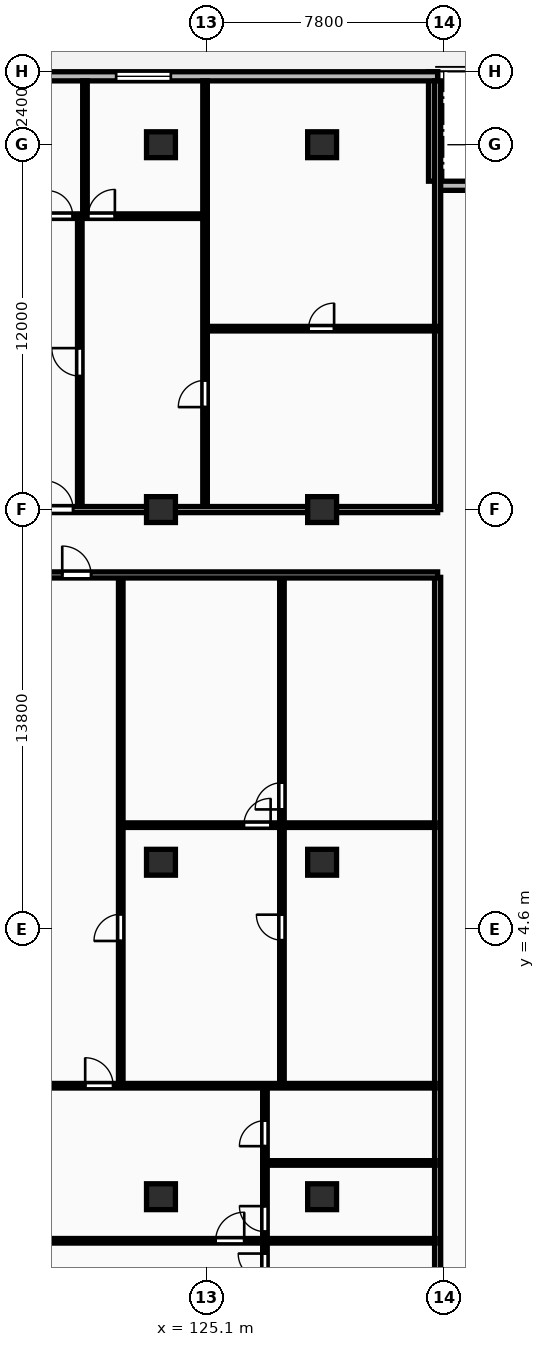
"""IFC4 building model, lengths in metres.
Left out: names, types, materials, properties, quantities, classifications, styles, units other than length and angle.
Written with IfcOpenShell. Run it as: python <this file> out.ifc"""

import sys

from ifc_helpers import new_model, si_unit, direction, frame, frame_2d, origin, origin_2d, place, context, subcontext, project, spatial, rectangle, extrude, element, fill, save


model = new_model("IFC4")
c1 = context("Model", 3, precision=1e-05, world=origin(), true_north=direction((0.0, 1.0)))
c2 = subcontext(c1, "Body", "Model", "MODEL_VIEW")
j1 = project(units=[si_unit("LENGTHUNIT", "METRE"), si_unit("PLANEANGLEUNIT", "RADIAN")], contexts=[c1])
p1 = place(None, origin())
s1 = spatial("IfcSite", under=j1, at=p1, CompositionType="ELEMENT")
p2 = place(p1, origin())
s2 = spatial("IfcBuilding", under=s1, at=p2, CompositionType="ELEMENT")
p3 = place(p2, frame((0.0, 0.0, 24.0)))
s3 = spatial("IfcBuildingStorey", under=s2, at=p3, CompositionType="ELEMENT", Elevation=24.0)
for number, where, z_axis, x_axis in (
    (1, (123.6, -4.2, 0.0), (0.0, 0.0, 1.0), (1.0, 0.0, 0.0)),
    (2, (123.6, 6.8, 0.0), (0.0, 0.0, 1.0), (1.0, 0.0, 0.0)),
    (3, (123.6, 18.4, 0.0), (0.0, 0.0, 1.0), (1.0, 0.0, 0.0)),
    (4, (123.6, 30.4, 0.0), (0.0, 0.0, 1.0), (1.0, 0.0, 0.0)),
    (5, (128.9, -4.2, 0.0), (0.0, 0.0, 1.0), (1.0, 0.0, 0.0)),
    (6, (128.9, 6.8, 0.0), (0.0, 0.0, 1.0), (1.0, 0.0, 0.0)),
    (7, (128.9, 18.4, 0.0), (0.0, 0.0, 1.0), (1.0, 0.0, 0.0)),
    (8, (128.9, 30.4, 0.0), (0.0, 0.0, 1.0), (1.0, 0.0, 0.0)),
):
    element("IfcColumn", number, at=place(p3, frame(where, z_axis=z_axis, x_axis=x_axis)), inside=s3, PredefinedType="COLUMN", context=c2, shape_type="SweptSolid", body=[
        extrude(rectangle(XDim=0.95, YDim=0.85, at=origin_2d()), origin(), (0.0, 0.0, 1.0), 3.25),
    ])
for number, where, z_axis, x_axis in (
    (9, (136.3, 29.05, 0.0), (0.0, 0.0, 1.0), (-1.0, 0.0, 0.0)),
    (10, (132.55, 29.2, 0.0), (0.0, 0.0, 1.0), (0.0, 1.0, 0.0)),
):
    element("IfcWall", number, at=place(p3, frame(where, z_axis=z_axis, x_axis=x_axis)), inside=s3, PredefinedType="STANDARD", context=c2, shape_type="SweptSolid", body=[
        extrude(rectangle(XDim=3.6, YDim=0.3, at=frame_2d((1.8, 0.0))), origin(), (0.0, 0.0, 1.0), 2.97),
    ])
p4 = place(p3, frame((132.7, 32.65, 0.0), z_axis=(0.0, 0.0, 1.0), x_axis=(-1.0, 0.0, 0.0)))
e11 = element("IfcWall", 11, at=p4, inside=s3, PredefinedType="STANDARD", context=c2, shape_type="SweptSolid", body=[
    extrude(rectangle(XDim=62.0, YDim=0.3, at=frame_2d((31.0, 0.0))), origin(), (0.0, 0.0, 1.0), 2.97),
])
p5 = place(p4, frame((52.125, 0.0, 0.85)))
e12 = element("IfcOpeningElement", 12, at=p5, cuts=e11, PredefinedType="OPENING", context=c2, shape_type="SweptSolid", body=[
    extrude(rectangle(XDim=1.8, YDim=1.8, at=frame_2d((0.9, 0.9))), frame((0.0, 0.16, 0.0), z_axis=(0.0, -1.0, 0.0), x_axis=(1.0, 0.0, 0.0)), (0.0, 0.0, 1.0), 0.32),
])
p6 = place(p4, frame((8.775, 0.0, 0.85)))
e13 = element("IfcOpeningElement", 13, at=p6, cuts=e11, PredefinedType="OPENING", context=c2, shape_type="SweptSolid", body=[
    extrude(rectangle(XDim=1.8, YDim=1.8, at=frame_2d((0.9, 0.9))), frame((0.0, 0.16, 0.0), z_axis=(0.0, -1.0, 0.0), x_axis=(1.0, 0.0, 0.0)), (0.0, 0.0, 1.0), 0.32),
])
p7 = place(p3, frame((132.7, 18.4, 0.0), z_axis=(0.0, 0.0, 1.0), x_axis=(0.0, 1.0, 0.0)))
e14 = element("IfcWall", 14, at=p7, inside=s3, PredefinedType="PARTITIONING", context=c2, shape_type="SweptSolid", body=[
    extrude(rectangle(XDim=14.1, YDim=0.2, at=frame_2d((7.05, 0.0))), origin(), (0.0, 0.0, 1.0), 2.97),
])
p8 = place(p3, frame((125.05, 24.35, 0.0), z_axis=(0.0, 0.0, 1.0), x_axis=(1.0, 0.0, 0.0)))
e15 = element("IfcWall", 15, at=p8, inside=s3, PredefinedType="PARTITIONING", context=c2, shape_type="SweptSolid", body=[
    extrude(rectangle(XDim=7.65, YDim=0.15, at=frame_2d((3.825, 0.0))), origin(), (0.0, 0.0, 1.0), 2.97),
])
p9 = place(p8, frame((3.405, 0.0, 0.0)))
e16 = element("IfcOpeningElement", 16, at=p9, cuts=e15, PredefinedType="OPENING", context=c2, shape_type="SweptSolid", body=[
    extrude(rectangle(XDim=0.84, YDim=2.04, at=frame_2d((0.42, 1.02))), frame((0.0, 0.085, 0.0), z_axis=(0.0, -1.0, 0.0), x_axis=(1.0, 0.0, 0.0)), (0.0, 0.0, 1.0), 0.17),
])
p10 = place(p3, frame((125.05, 18.45, 0.0), z_axis=(0.0, 0.0, 1.0), x_axis=(0.0, 1.0, 0.0)))
e17 = element("IfcWall", 17, at=p10, inside=s3, PredefinedType="PARTITIONING", context=c2, shape_type="SweptSolid", body=[
    extrude(rectangle(XDim=14.05, YDim=0.15, at=frame_2d((7.025, 0.0))), origin(), (0.0, 0.0, 1.0), 2.97),
])
p11 = place(p10, frame((3.32, 0.0, 0.0)))
e18 = element("IfcOpeningElement", 18, at=p11, cuts=e17, PredefinedType="OPENING", context=c2, shape_type="SweptSolid", body=[
    extrude(rectangle(XDim=0.88, YDim=2.06, at=frame_2d((0.44, 1.03))), frame((0.0, 0.085, 0.0), z_axis=(0.0, -1.0, 0.0), x_axis=(1.0, 0.0, 0.0)), (0.0, 0.0, 1.0), 0.17),
])
p12 = place(p3, frame((120.93, 18.45, 0.0), z_axis=(0.0, 0.0, 1.0), x_axis=(0.0, 1.0, 0.0)))
e19 = element("IfcWall", 19, at=p12, inside=s3, PredefinedType="PARTITIONING", context=c2, shape_type="SweptSolid", body=[
    extrude(rectangle(XDim=9.6, YDim=0.15, at=frame_2d((4.8, 0.0))), origin(), (0.0, 0.0, 1.0), 2.97),
])
p13 = place(p12, frame((4.34, 0.0, 0.0)))
e20 = element("IfcOpeningElement", 20, at=p13, cuts=e19, PredefinedType="OPENING", context=c2, shape_type="SweptSolid", body=[
    extrude(rectangle(XDim=0.92, YDim=2.08, at=frame_2d((0.46, 1.04))), frame((0.0, 0.085, 0.0), z_axis=(0.0, -1.0, 0.0), x_axis=(1.0, 0.0, 0.0)), (0.0, 0.0, 1.0), 0.17),
])
p14 = place(p3, frame((121.1, 28.05, 0.0), z_axis=(0.0, 0.0, 1.0), x_axis=(0.0, 1.0, 0.0)))
e21 = element("IfcWall", 21, at=p14, inside=s3, PredefinedType="PARTITIONING", context=c2, shape_type="SweptSolid", body=[
    extrude(rectangle(XDim=4.45, YDim=0.15, at=frame_2d((2.225, 0.0))), origin(), (0.0, 0.0, 1.0), 2.97),
])
p15 = place(p3, frame((118.27, 28.05, 0.0), z_axis=(0.0, 0.0, 1.0), x_axis=(1.0, 0.0, 0.0)))
e22 = element("IfcWall", 22, at=p15, inside=s3, PredefinedType="PARTITIONING", context=c2, shape_type="SweptSolid", body=[
    extrude(rectangle(XDim=6.76, YDim=0.15, at=frame_2d((3.38, 0.0))), origin(), (0.0, 0.0, 1.0), 2.97),
])
p16 = place(p15, frame((1.587, 0.0, 0.0)))
e23 = element("IfcOpeningElement", 23, at=p16, cuts=e22, PredefinedType="OPENING", context=c2, shape_type="SweptSolid", body=[
    extrude(rectangle(XDim=0.84, YDim=2.04, at=frame_2d((0.42, 1.02))), frame((0.0, 0.085, 0.0), z_axis=(0.0, -1.0, 0.0), x_axis=(1.0, 0.0, 0.0)), (0.0, 0.0, 1.0), 0.17),
])
p17 = place(p15, frame((2.934, 0.0, 0.0)))
e24 = element("IfcOpeningElement", 24, at=p17, cuts=e22, PredefinedType="OPENING", context=c2, shape_type="SweptSolid", body=[
    extrude(rectangle(XDim=0.88, YDim=2.06, at=frame_2d((0.44, 1.03))), frame((0.0, 0.085, 0.0), z_axis=(0.0, -1.0, 0.0), x_axis=(1.0, 0.0, 0.0)), (0.0, 0.0, 1.0), 0.17),
])
p18 = place(p3, frame((118.25, 18.4, 0.0), z_axis=(0.0, 0.0, 1.0), x_axis=(1.0, 0.0, 0.0)))
e25 = element("IfcWall", 25, at=p18, inside=s3, PredefinedType="PARTITIONING", context=c2, shape_type="SweptSolid", body=[
    extrude(rectangle(XDim=14.45, YDim=0.2, at=frame_2d((7.225, 0.0))), origin(), (0.0, 0.0, 1.0), 2.37),
])
p19 = place(p18, frame((1.51, 0.0, 0.0)))
e26 = element("IfcOpeningElement", 26, at=p19, cuts=e25, PredefinedType="OPENING", context=c2, shape_type="SweptSolid", body=[
    extrude(rectangle(XDim=0.95, YDim=2.15, at=frame_2d((0.475, 1.075))), frame((0.0, 0.11, 0.0), z_axis=(0.0, -1.0, 0.0), x_axis=(1.0, 0.0, 0.0)), (0.0, 0.0, 1.0), 0.22),
])
p20 = place(p3, frame((132.7, -10.9, 0.0), z_axis=(0.0, 0.0, 1.0), x_axis=(0.0, 1.0, 0.0)))
e27 = element("IfcWall", 27, at=p20, inside=s3, PredefinedType="PARTITIONING", context=c2, shape_type="SweptSolid", body=[
    extrude(rectangle(XDim=27.07, YDim=0.2, at=frame_2d((13.535, 0.0))), origin(), (0.0, 0.0, 1.0), 2.97),
])
p21 = place(p3, frame((127.579, -0.51, 0.0), z_axis=(0.0, 0.0, 1.0), x_axis=(0.0, 1.0, 0.0)))
e28 = element("IfcWall", 28, at=p21, inside=s3, PredefinedType="PARTITIONING", context=c2, shape_type="SweptSolid", body=[
    extrude(rectangle(XDim=16.7, YDim=0.15, at=frame_2d((8.35, 0.0))), origin(), (0.0, 0.0, 1.0), 2.97),
])
p22 = place(p21, frame((4.746, 0.0, 0.0)))
e29 = element("IfcOpeningElement", 29, at=p22, cuts=e28, PredefinedType="OPENING", context=c2, shape_type="SweptSolid", body=[
    extrude(rectangle(XDim=0.84, YDim=2.04, at=frame_2d((0.42, 1.02))), frame((0.0, 0.085, 0.0), z_axis=(0.0, -1.0, 0.0), x_axis=(1.0, 0.0, 0.0)), (0.0, 0.0, 1.0), 0.17),
])
p23 = place(p21, frame((9.048, 0.0, 0.0)))
e30 = element("IfcOpeningElement", 30, at=p23, cuts=e28, PredefinedType="OPENING", context=c2, shape_type="SweptSolid", body=[
    extrude(rectangle(XDim=0.88, YDim=2.06, at=frame_2d((0.44, 1.03))), frame((0.0, 0.085, 0.0), z_axis=(0.0, -1.0, 0.0), x_axis=(1.0, 0.0, 0.0)), (0.0, 0.0, 1.0), 0.17),
])
p24 = place(p3, frame((122.337, 8.02, 0.0), z_axis=(0.0, 0.0, 1.0), x_axis=(1.0, 0.0, 0.0)))
e31 = element("IfcWall", 31, at=p24, inside=s3, PredefinedType="PARTITIONING", context=c2, shape_type="SweptSolid", body=[
    extrude(rectangle(XDim=10.283, YDim=0.15, at=frame_2d((5.142, 0.0))), origin(), (0.0, 0.0, 1.0), 2.97),
])
p25 = place(p24, frame((3.99, 0.0, 0.0)))
e32 = element("IfcOpeningElement", 32, at=p25, cuts=e31, PredefinedType="OPENING", context=c2, shape_type="SweptSolid", body=[
    extrude(rectangle(XDim=0.88, YDim=2.06, at=frame_2d((0.44, 1.03))), frame((0.0, 0.085, 0.0), z_axis=(0.0, -1.0, 0.0), x_axis=(1.0, 0.0, 0.0)), (0.0, 0.0, 1.0), 0.17),
])
p26 = place(p3, frame((122.277, -0.51, 0.0), z_axis=(0.0, 0.0, 1.0), x_axis=(0.0, 1.0, 0.0)))
e33 = element("IfcWall", 33, at=p26, inside=s3, PredefinedType="PARTITIONING", context=c2, shape_type="SweptSolid", body=[
    extrude(rectangle(XDim=16.7, YDim=0.15, at=frame_2d((8.35, 0.0))), origin(), (0.0, 0.0, 1.0), 2.97),
])
p27 = place(p26, frame((4.721, 0.0, 0.0)))
e34 = element("IfcOpeningElement", 34, at=p27, cuts=e33, PredefinedType="OPENING", context=c2, shape_type="SweptSolid", body=[
    extrude(rectangle(XDim=0.88, YDim=2.06, at=frame_2d((0.44, 1.03))), frame((0.0, 0.085, 0.0), z_axis=(0.0, -1.0, 0.0), x_axis=(1.0, 0.0, 0.0)), (0.0, 0.0, 1.0), 0.17),
])
p28 = place(p3, frame((127.08, -3.09, 0.0), z_axis=(0.0, 0.0, 1.0), x_axis=(1.0, 0.0, 0.0)))
e35 = element("IfcWall", 35, at=p28, inside=s3, PredefinedType="PARTITIONING", context=c2, shape_type="SweptSolid", body=[
    extrude(rectangle(XDim=5.54, YDim=0.15, at=frame_2d((2.77, 0.0))), origin(), (0.0, 0.0, 1.0), 2.97),
])
p29 = place(p3, frame((127.02, -10.9, 0.0), z_axis=(0.0, 0.0, 1.0), x_axis=(0.0, 1.0, 0.0)))
e36 = element("IfcWall", 36, at=p29, inside=s3, PredefinedType="PARTITIONING", context=c2, shape_type="SweptSolid", body=[
    extrude(rectangle(XDim=10.31, YDim=0.15, at=frame_2d((5.155, 0.0))), origin(), (0.0, 0.0, 1.0), 2.97),
])
p30 = place(p29, frame((5.55, 0.0, 0.0)))
e37 = element("IfcOpeningElement", 37, at=p30, cuts=e36, PredefinedType="OPENING", context=c2, shape_type="SweptSolid", body=[
    extrude(rectangle(XDim=0.84, YDim=2.04, at=frame_2d((0.42, 1.02))), frame((0.0, 0.085, 0.0), z_axis=(0.0, -1.0, 0.0), x_axis=(1.0, 0.0, 0.0)), (0.0, 0.0, 1.0), 0.17),
])
p31 = place(p29, frame((8.362, 0.0, 0.0)))
e38 = element("IfcOpeningElement", 38, at=p31, cuts=e36, PredefinedType="OPENING", context=c2, shape_type="SweptSolid", body=[
    extrude(rectangle(XDim=0.84, YDim=2.04, at=frame_2d((0.42, 1.02))), frame((0.0, 0.085, 0.0), z_axis=(0.0, -1.0, 0.0), x_axis=(1.0, 0.0, 0.0)), (0.0, 0.0, 1.0), 0.17),
])
p32 = place(p29, frame((3.95, 0.0, 0.0)))
e39 = element("IfcOpeningElement", 39, at=p32, cuts=e36, PredefinedType="OPENING", context=c2, shape_type="SweptSolid", body=[
    extrude(rectangle(XDim=0.88, YDim=2.06, at=frame_2d((0.44, 1.03))), frame((0.0, 0.085, 0.0), z_axis=(0.0, -1.0, 0.0), x_axis=(1.0, 0.0, 0.0)), (0.0, 0.0, 1.0), 0.17),
])
p33 = place(p3, frame((118.387, -0.55, 0.0), z_axis=(0.0, 0.0, 1.0), x_axis=(1.0, 0.0, 0.0)))
e40 = element("IfcWall", 40, at=p33, inside=s3, PredefinedType="PARTITIONING", context=c2, shape_type="SweptSolid", body=[
    extrude(rectangle(XDim=14.233, YDim=0.15, at=frame_2d((7.116, 0.0))), origin(), (0.0, 0.0, 1.0), 2.97),
])
p34 = place(p33, frame((2.72, 0.0, 0.0)))
e41 = element("IfcOpeningElement", 41, at=p34, cuts=e40, PredefinedType="OPENING", context=c2, shape_type="SweptSolid", body=[
    extrude(rectangle(XDim=0.92, YDim=2.08, at=frame_2d((0.46, 1.04))), frame((0.0, 0.085, 0.0), z_axis=(0.0, -1.0, 0.0), x_axis=(1.0, 0.0, 0.0)), (0.0, 0.0, 1.0), 0.17),
])
p35 = place(p3, frame((118.387, -5.65, 0.0), z_axis=(0.0, 0.0, 1.0), x_axis=(1.0, 0.0, 0.0)))
e42 = element("IfcWall", 42, at=p35, inside=s3, PredefinedType="PARTITIONING", context=c2, shape_type="SweptSolid", body=[
    extrude(rectangle(XDim=14.233, YDim=0.15, at=frame_2d((7.116, 0.0))), origin(), (0.0, 0.0, 1.0), 2.97),
])
p36 = place(p35, frame((7.011, 0.0, 0.0)))
e43 = element("IfcOpeningElement", 43, at=p36, cuts=e42, PredefinedType="OPENING", context=c2, shape_type="SweptSolid", body=[
    extrude(rectangle(XDim=0.94, YDim=2.1, at=frame_2d((0.47, 1.05))), frame((0.0, 0.085, 0.0), z_axis=(0.0, -1.0, 0.0), x_axis=(1.0, 0.0, 0.0)), (0.0, 0.0, 1.0), 0.17),
])
p37 = place(p3, frame((70.7, 16.25, 0.0), z_axis=(0.0, 0.0, 1.0), x_axis=(1.0, 0.0, 0.0)))
e44 = element("IfcWall", 44, at=p37, inside=s3, PredefinedType="PARTITIONING", context=c2, shape_type="SweptSolid", body=[
    extrude(rectangle(XDim=62.0, YDim=0.2, at=frame_2d((31.0, 0.0))), origin(), (0.0, 0.0, 1.0), 2.97),
])
p38 = place(p37, frame((1.186, 0.0, 0.0)))
e45 = element("IfcOpeningElement", 45, at=p38, cuts=e44, PredefinedType="OPENING", context=c2, shape_type="SweptSolid", body=[
    extrude(rectangle(XDim=0.95, YDim=2.15, at=frame_2d((0.475, 1.075))), frame((0.0, 0.11, 0.0), z_axis=(0.0, -1.0, 0.0), x_axis=(1.0, 0.0, 0.0)), (0.0, 0.0, 1.0), 0.22),
])
p39 = place(p37, frame((13.116, 0.0, 0.0)))
e46 = element("IfcOpeningElement", 46, at=p39, cuts=e44, PredefinedType="OPENING", context=c2, shape_type="SweptSolid", body=[
    extrude(rectangle(XDim=0.95, YDim=2.15, at=frame_2d((0.475, 1.075))), frame((0.0, 0.11, 0.0), z_axis=(0.0, -1.0, 0.0), x_axis=(1.0, 0.0, 0.0)), (0.0, 0.0, 1.0), 0.22),
])
p40 = place(p37, frame((25.295, 0.0, 0.0)))
e47 = element("IfcOpeningElement", 47, at=p40, cuts=e44, PredefinedType="OPENING", context=c2, shape_type="SweptSolid", body=[
    extrude(rectangle(XDim=0.95, YDim=2.15, at=frame_2d((0.475, 1.075))), frame((0.0, 0.11, 0.0), z_axis=(0.0, -1.0, 0.0), x_axis=(1.0, 0.0, 0.0)), (0.0, 0.0, 1.0), 0.22),
])
p41 = place(p37, frame((35.747, 0.0, 0.0)))
e48 = element("IfcOpeningElement", 48, at=p41, cuts=e44, PredefinedType="OPENING", context=c2, shape_type="SweptSolid", body=[
    extrude(rectangle(XDim=0.95, YDim=2.15, at=frame_2d((0.475, 1.075))), frame((0.0, 0.11, 0.0), z_axis=(0.0, -1.0, 0.0), x_axis=(1.0, 0.0, 0.0)), (0.0, 0.0, 1.0), 0.22),
])
p42 = place(p37, frame((49.652, 0.0, 0.0)))
e49 = element("IfcOpeningElement", 49, at=p42, cuts=e44, PredefinedType="OPENING", context=c2, shape_type="SweptSolid", body=[
    extrude(rectangle(XDim=0.95, YDim=2.15, at=frame_2d((0.475, 1.075))), frame((0.0, 0.11, 0.0), z_axis=(0.0, -1.0, 0.0), x_axis=(1.0, 0.0, 0.0)), (0.0, 0.0, 1.0), 0.22),
])
p43 = place(p6, origin())
e50 = element("IfcWindow", 50, at=p43, inside=s3, PartitioningType="SINGLE_PANEL", PredefinedType="WINDOW", context=c2, shape_type="SweptSolid", body=[
    extrude(rectangle(XDim=1.8, YDim=1.8, at=frame_2d((0.9, 0.9))), frame((0.0, 0.03, 0.0), z_axis=(0.0, -1.0, 0.0), x_axis=(1.0, 0.0, 0.0)), (0.0, 0.0, 1.0), 0.06),
])
fill(e13, e50)
p44 = place(p9, origin())
e51 = element("IfcDoor", 51, at=p44, inside=s3, OperationType="SINGLE_SWING_RIGHT", PredefinedType="DOOR", context=c2, shape_type="SweptSolid", body=[
    extrude(rectangle(XDim=0.84, YDim=2.04, at=frame_2d((0.42, 1.02))), frame((0.0, 0.025, 0.0), z_axis=(0.0, -1.0, 0.0), x_axis=(1.0, 0.0, 0.0)), (0.0, 0.0, 1.0), 0.05),
])
fill(e16, e51)
p45 = place(p11, origin())
e52 = element("IfcDoor", 52, at=p45, inside=s3, OperationType="SINGLE_SWING_LEFT", PredefinedType="DOOR", context=c2, shape_type="SweptSolid", body=[
    extrude(rectangle(XDim=0.88, YDim=2.06, at=frame_2d((0.44, 1.03))), frame((0.0, 0.025, 0.0), z_axis=(0.0, -1.0, 0.0), x_axis=(1.0, 0.0, 0.0)), (0.0, 0.0, 1.0), 0.05),
])
fill(e18, e52)
p46 = place(p13, origin())
e53 = element("IfcDoor", 53, at=p46, inside=s3, OperationType="SINGLE_SWING_RIGHT", PredefinedType="DOOR", context=c2, shape_type="SweptSolid", body=[
    extrude(rectangle(XDim=0.92, YDim=2.08, at=frame_2d((0.46, 1.04))), frame((0.0, 0.025, 0.0), z_axis=(0.0, -1.0, 0.0), x_axis=(1.0, 0.0, 0.0)), (0.0, 0.0, 1.0), 0.05),
])
fill(e20, e53)
p47 = place(p16, origin())
e54 = element("IfcDoor", 54, at=p47, inside=s3, OperationType="SINGLE_SWING_LEFT", PredefinedType="DOOR", context=c2, shape_type="SweptSolid", body=[
    extrude(rectangle(XDim=0.84, YDim=2.04, at=frame_2d((0.42, 1.02))), frame((0.0, 0.025, 0.0), z_axis=(0.0, -1.0, 0.0), x_axis=(1.0, 0.0, 0.0)), (0.0, 0.0, 1.0), 0.05),
])
fill(e23, e54)
p48 = place(p17, origin())
e55 = element("IfcDoor", 55, at=p48, inside=s3, OperationType="SINGLE_SWING_RIGHT", PredefinedType="DOOR", context=c2, shape_type="SweptSolid", body=[
    extrude(rectangle(XDim=0.88, YDim=2.06, at=frame_2d((0.44, 1.03))), frame((0.0, 0.025, 0.0), z_axis=(0.0, -1.0, 0.0), x_axis=(1.0, 0.0, 0.0)), (0.0, 0.0, 1.0), 0.05),
])
fill(e24, e55)
p49 = place(p19, origin())
e56 = element("IfcDoor", 56, at=p49, inside=s3, OperationType="SINGLE_SWING_LEFT", PredefinedType="DOOR", context=c2, shape_type="SweptSolid", body=[
    extrude(rectangle(XDim=0.95, YDim=2.15, at=frame_2d((0.475, 1.075))), frame((0.0, 0.025, 0.0), z_axis=(0.0, -1.0, 0.0), x_axis=(1.0, 0.0, 0.0)), (0.0, 0.0, 1.0), 0.05),
])
fill(e26, e56)
p50 = place(p22, origin())
e57 = element("IfcDoor", 57, at=p50, inside=s3, OperationType="SINGLE_SWING_RIGHT", PredefinedType="DOOR", context=c2, shape_type="SweptSolid", body=[
    extrude(rectangle(XDim=0.84, YDim=2.04, at=frame_2d((0.42, 1.02))), frame((0.0, 0.025, 0.0), z_axis=(0.0, -1.0, 0.0), x_axis=(1.0, 0.0, 0.0)), (0.0, 0.0, 1.0), 0.05),
])
fill(e29, e57)
p51 = place(p23, origin())
e58 = element("IfcDoor", 58, at=p51, inside=s3, OperationType="SINGLE_SWING_LEFT", PredefinedType="DOOR", context=c2, shape_type="SweptSolid", body=[
    extrude(rectangle(XDim=0.88, YDim=2.06, at=frame_2d((0.44, 1.03))), frame((0.0, 0.025, 0.0), z_axis=(0.0, -1.0, 0.0), x_axis=(1.0, 0.0, 0.0)), (0.0, 0.0, 1.0), 0.05),
])
fill(e30, e58)
p52 = place(p25, origin())
e59 = element("IfcDoor", 59, at=p52, inside=s3, OperationType="SINGLE_SWING_RIGHT", PredefinedType="DOOR", context=c2, shape_type="SweptSolid", body=[
    extrude(rectangle(XDim=0.88, YDim=2.06, at=frame_2d((0.44, 1.03))), frame((0.0, 0.025, 0.0), z_axis=(0.0, -1.0, 0.0), x_axis=(1.0, 0.0, 0.0)), (0.0, 0.0, 1.0), 0.05),
])
fill(e32, e59)
p53 = place(p27, origin())
e60 = element("IfcDoor", 60, at=p53, inside=s3, OperationType="SINGLE_SWING_LEFT", PredefinedType="DOOR", context=c2, shape_type="SweptSolid", body=[
    extrude(rectangle(XDim=0.88, YDim=2.06, at=frame_2d((0.44, 1.03))), frame((0.0, 0.025, 0.0), z_axis=(0.0, -1.0, 0.0), x_axis=(1.0, 0.0, 0.0)), (0.0, 0.0, 1.0), 0.05),
])
fill(e34, e60)
p54 = place(p30, origin())
e61 = element("IfcDoor", 61, at=p54, inside=s3, OperationType="SINGLE_SWING_RIGHT", PredefinedType="DOOR", context=c2, shape_type="SweptSolid", body=[
    extrude(rectangle(XDim=0.84, YDim=2.04, at=frame_2d((0.42, 1.02))), frame((0.0, 0.025, 0.0), z_axis=(0.0, -1.0, 0.0), x_axis=(1.0, 0.0, 0.0)), (0.0, 0.0, 1.0), 0.05),
])
fill(e37, e61)
p55 = place(p31, origin())
e62 = element("IfcDoor", 62, at=p55, inside=s3, OperationType="SINGLE_SWING_LEFT", PredefinedType="DOOR", context=c2, shape_type="SweptSolid", body=[
    extrude(rectangle(XDim=0.84, YDim=2.04, at=frame_2d((0.42, 1.02))), frame((0.0, 0.025, 0.0), z_axis=(0.0, -1.0, 0.0), x_axis=(1.0, 0.0, 0.0)), (0.0, 0.0, 1.0), 0.05),
])
fill(e38, e62)
p56 = place(p32, origin())
e63 = element("IfcDoor", 63, at=p56, inside=s3, OperationType="SINGLE_SWING_RIGHT", PredefinedType="DOOR", context=c2, shape_type="SweptSolid", body=[
    extrude(rectangle(XDim=0.88, YDim=2.06, at=frame_2d((0.44, 1.03))), frame((0.0, 0.025, 0.0), z_axis=(0.0, -1.0, 0.0), x_axis=(1.0, 0.0, 0.0)), (0.0, 0.0, 1.0), 0.05),
])
fill(e39, e63)
p57 = place(p34, origin())
e64 = element("IfcDoor", 64, at=p57, inside=s3, OperationType="SINGLE_SWING_LEFT", PredefinedType="DOOR", context=c2, shape_type="SweptSolid", body=[
    extrude(rectangle(XDim=0.92, YDim=2.08, at=frame_2d((0.46, 1.04))), frame((0.0, 0.025, 0.0), z_axis=(0.0, -1.0, 0.0), x_axis=(1.0, 0.0, 0.0)), (0.0, 0.0, 1.0), 0.05),
])
fill(e41, e64)
p58 = place(p36, origin())
e65 = element("IfcDoor", 65, at=p58, inside=s3, OperationType="SINGLE_SWING_RIGHT", PredefinedType="DOOR", context=c2, shape_type="SweptSolid", body=[
    extrude(rectangle(XDim=0.94, YDim=2.1, at=frame_2d((0.47, 1.05))), frame((0.0, 0.025, 0.0), z_axis=(0.0, -1.0, 0.0), x_axis=(1.0, 0.0, 0.0)), (0.0, 0.0, 1.0), 0.05),
])
fill(e43, e65)
p59 = place(p42, origin())
e66 = element("IfcDoor", 66, at=p59, inside=s3, OperationType="SINGLE_SWING_LEFT", PredefinedType="DOOR", context=c2, shape_type="SweptSolid", body=[
    extrude(rectangle(XDim=0.95, YDim=2.15, at=frame_2d((0.475, 1.075))), frame((0.0, 0.025, 0.0), z_axis=(0.0, -1.0, 0.0), x_axis=(1.0, 0.0, 0.0)), (0.0, 0.0, 1.0), 0.05),
])
fill(e49, e66)
save(model, sys.argv[1])
